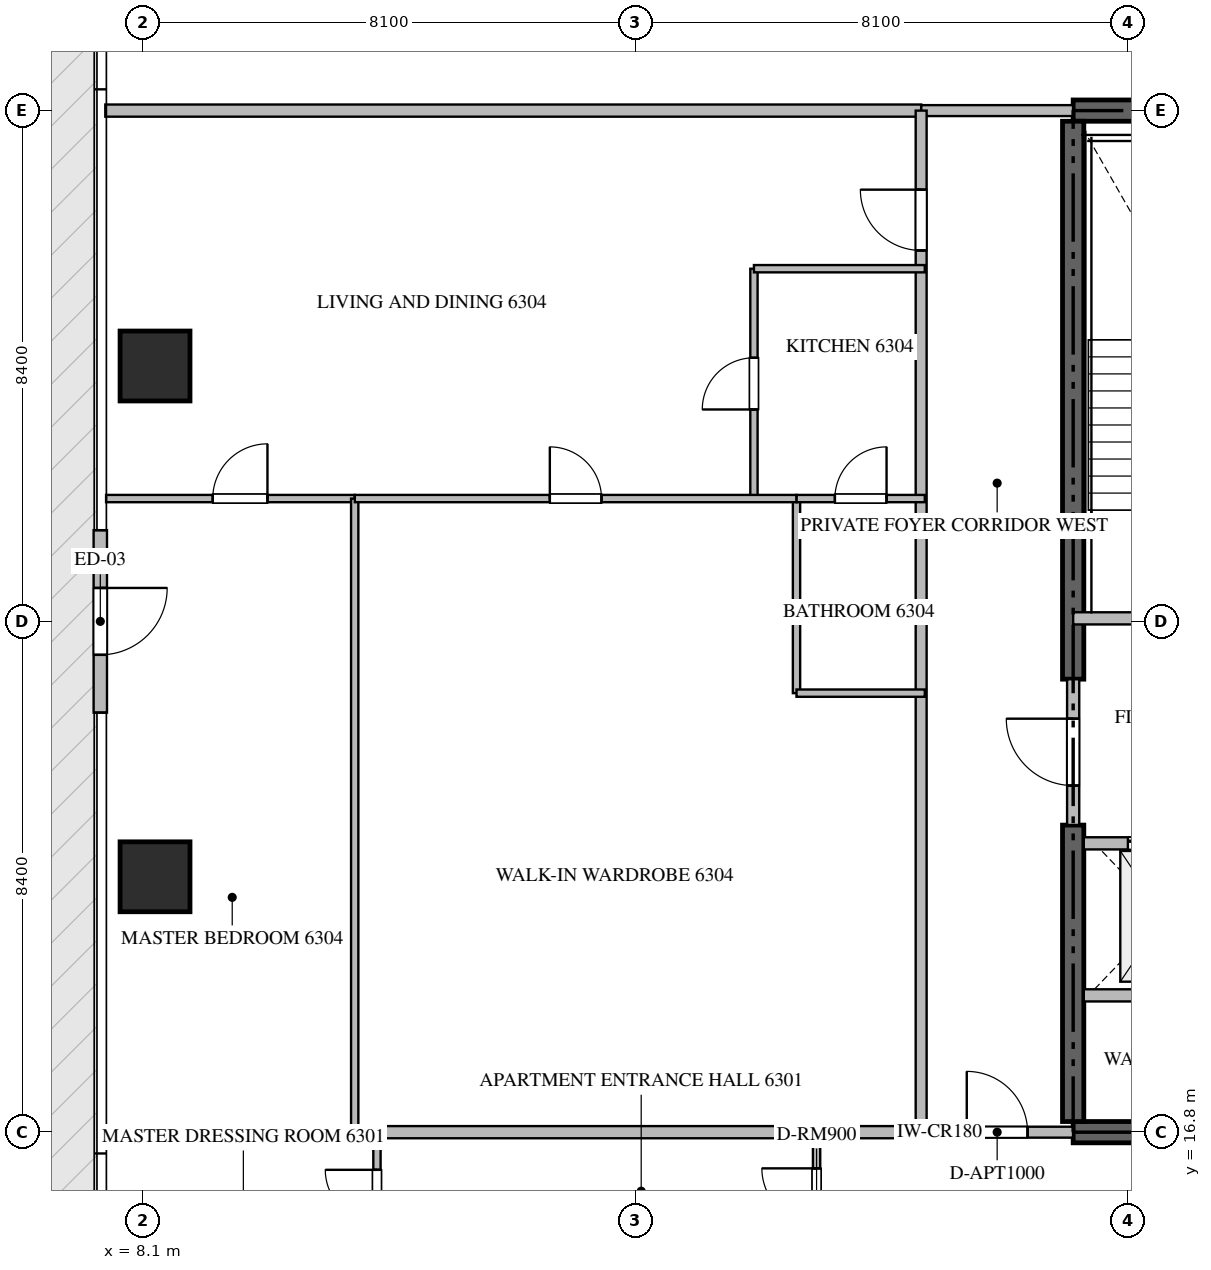
"""IFC4 building model, lengths in metres.
Left out: names, types, materials, properties, quantities, classifications, styles, units other than length and angle.
Written with IfcOpenShell. Run it as: python <this file> out.ifc"""

import sys

from ifc_helpers import new_model, si_unit, direction, frame, frame_2d, origin, origin_2d, place, context, subcontext, project, spatial, rectangle, extrude, source, transform, mapped, element, fill, save


model = new_model("IFC4")
c1 = context("Model", 3, precision=1e-05, world=origin(), true_north=direction((0.0, 1.0)))
c2 = subcontext(c1, "Body", "Model", "MODEL_VIEW")
j1 = project(units=[si_unit("LENGTHUNIT", "METRE"), si_unit("PLANEANGLEUNIT", "RADIAN")], contexts=[c1])
p1 = place(None, origin())
s1 = spatial("IfcSite", under=j1, at=p1, CompositionType="ELEMENT")
p2 = place(p1, origin())
s2 = spatial("IfcBuilding", under=s1, at=p2, CompositionType="ELEMENT")
p3 = place(p2, frame((0.0, 0.0, 252.8)))
s3 = spatial("IfcBuildingStorey", under=s2, at=p3, CompositionType="ELEMENT", Elevation=252.8)
for number, where, z_axis, x_axis in (
    (1, (23.4, 16.8, -0.26), (0.0, 0.0, 1.0), (1.0, 0.0, 0.0)),
    (2, (41.4, 33.6, -0.26), (0.0, 0.0, 1.0), (-1.0, 0.0, 0.0)),
):
    element("IfcWall", number, at=place(p3, frame(where, z_axis=z_axis, x_axis=x_axis)), inside=s3, PredefinedType="SHEAR", context=c2, shape_type="SweptSolid", body=[
        extrude(rectangle(XDim=18.0, YDim=0.35, at=frame_2d((9.0, 0.0))), origin(), (0.0, 0.0, 1.0), 3.848),
    ])
p4 = place(p3, frame((23.4, 16.975, -0.26), z_axis=(0.0, 0.0, 1.0), x_axis=(0.0, 1.0, 0.0)))
e3 = element("IfcWall", 3, at=p4, inside=s3, PredefinedType="SHEAR", context=c2, shape_type="SweptSolid", body=[
    extrude(rectangle(XDim=4.875, YDim=0.35, at=frame_2d((2.438, 0.0))), origin(), (0.0, 0.0, 1.0), 3.848),
])
p5 = place(p3, frame((23.4, 24.25, -0.26), z_axis=(0.0, 0.0, 1.0), x_axis=(0.0, 1.0, 0.0)))
e4 = element("IfcWall", 4, at=p5, inside=s3, PredefinedType="SHEAR", context=c2, shape_type="SweptSolid", body=[
    extrude(rectangle(XDim=9.175, YDim=0.35, at=frame_2d((4.587, 0.0))), origin(), (0.0, 0.0, 1.0), 3.848),
])
m1 = source(origin(), c2, "Body", "SweptSolid", [
    extrude(rectangle(XDim=1.15, YDim=1.15, at=origin_2d()), origin(), (0.0, 0.0, 1.0), 3.85),
])
for number, where, z_axis, x_axis in (
    (5, (8.3, 21.0, -0.26), (0.0, 0.0, 1.0), (1.0, 0.0, 0.0)),
    (6, (8.3, 29.4, -0.26), (0.0, 0.0, 1.0), (1.0, 0.0, 0.0)),
):
    element("IfcColumn", number, at=place(p3, frame(where, z_axis=z_axis, x_axis=x_axis)), inside=s3, PredefinedType="COLUMN", context=c2, shape_type="MappedRepresentation", body=[
        mapped(m1, transform((0.0, 0.0, 0.0), scale=1.0)),
    ])
p6 = place(p3, frame((7.4, 26.7, 0.0), z_axis=(0.0, 0.0, 1.0), x_axis=(0.0, -1.0, 0.0)))
e7 = element("IfcWall", 7, at=p6, inside=s3, PredefinedType="ELEMENTEDWALL", context=c2, shape_type="SweptSolid", body=[
    extrude(rectangle(XDim=3.0, YDim=0.22, at=frame_2d((1.5, 0.0))), origin(), (0.0, 0.0, 1.0), 3.575),
])
p7 = place(p6, frame((0.95, 0.0, 0.0)))
e8 = element("IfcOpeningElement", 8, at=p7, cuts=e7, PredefinedType="OPENING", context=c2, shape_type="SweptSolid", body=[
    extrude(rectangle(XDim=1.1, YDim=2.2, at=frame_2d((0.55, 1.1))), frame((0.0, 0.12, 0.0), z_axis=(0.0, -1.0, 0.0), x_axis=(1.0, 0.0, 0.0)), (0.0, 0.0, 1.0), 0.24),
])
p8 = place(p3, frame((23.4, 25.25, 0.0), z_axis=(0.0, 0.0, 1.0), x_axis=(1.0, 0.0, 0.0)))
e9 = element("IfcWall", 9, at=p8, inside=s3, PredefinedType="STANDARD", context=c2, shape_type="SweptSolid", body=[
    extrude(rectangle(XDim=4.45, YDim=0.2, at=frame_2d((2.225, 0.0))), origin(), (0.0, 0.0, 1.0), 3.59),
])
p9 = place(p8, frame((1.65, 0.0, 0.0)))
e10 = element("IfcOpeningElement", 10, at=p9, cuts=e9, PredefinedType="OPENING", context=c2, shape_type="SweptSolid", body=[
    extrude(rectangle(XDim=1.1, YDim=2.15, at=frame_2d((0.55, 1.075))), frame((0.0, 0.11, 0.0), z_axis=(0.0, -1.0, 0.0), x_axis=(1.0, 0.0, 0.0)), (0.0, 0.0, 1.0), 0.22),
])
p10 = place(p3, frame((23.575, 21.55, 0.0), z_axis=(0.0, 0.0, 1.0), x_axis=(1.0, 0.0, 0.0)))
e11 = element("IfcWall", 11, at=p10, inside=s3, PredefinedType="STANDARD", context=c2, shape_type="SweptSolid", body=[
    extrude(rectangle(XDim=2.475, YDim=0.2, at=frame_2d((1.238, 0.0))), origin(), (0.0, 0.0, 1.0), 3.59),
])
p11 = place(p10, frame((0.725, 0.0, 0.0)))
e12 = element("IfcOpeningElement", 12, at=p11, cuts=e11, PredefinedType="OPENING", context=c2, shape_type="SweptSolid", body=[
    extrude(rectangle(XDim=1.2, YDim=2.2, at=frame_2d((0.6, 1.1))), frame((0.0, 0.11, 0.0), z_axis=(0.0, -1.0, 0.0), x_axis=(1.0, 0.0, 0.0)), (0.0, 0.0, 1.0), 0.22),
])
p12 = place(p3, frame((23.575, 19.05, 0.0), z_axis=(0.0, 0.0, 1.0), x_axis=(1.0, 0.0, 0.0)))
e13 = element("IfcWall", 13, at=p12, inside=s3, PredefinedType="STANDARD", context=c2, shape_type="SweptSolid", body=[
    extrude(rectangle(XDim=2.475, YDim=0.2, at=frame_2d((1.238, 0.0))), origin(), (0.0, 0.0, 1.0), 3.59),
])
p13 = place(p3, frame((23.4, 21.852, 0.0), z_axis=(0.0, 0.0, 1.0), x_axis=(0.0, 1.0, 0.0)))
e14 = element("IfcWall", 14, at=p13, inside=s3, PredefinedType="STANDARD", context=c2, shape_type="SweptSolid", body=[
    extrude(rectangle(XDim=2.396, YDim=0.2, at=frame_2d((1.198, 0.0))), origin(), (0.0, 0.0, 1.0), 3.59),
])
p14 = place(p13, frame((0.648, 0.0, 0.0)))
e15 = element("IfcOpeningElement", 15, at=p14, cuts=e14, PredefinedType="OPENING", context=c2, shape_type="SweptSolid", body=[
    extrude(rectangle(XDim=1.1, YDim=2.15, at=frame_2d((0.55, 1.075))), frame((0.0, 0.11, 0.0), z_axis=(0.0, -1.0, 0.0), x_axis=(1.0, 0.0, 0.0)), (0.0, 0.0, 1.0), 0.22),
])
for number, where, z_axis, x_axis in (
    (16, (7.482, 16.8, 0.0), (0.0, 0.0, 1.0), (1.0, 0.0, 0.0)),
    (17, (7.482, 33.6, 0.0), (0.0, 0.0, 1.0), (1.0, 0.0, 0.0)),
):
    element("IfcWall", number, at=place(p3, frame(where, z_axis=z_axis, x_axis=x_axis)), inside=s3, PredefinedType="PARTITIONING", context=c2, shape_type="SweptSolid", body=[
        extrude(rectangle(XDim=13.418, YDim=0.2, at=frame_2d((6.709, 0.0))), origin(), (0.0, 0.0, 1.0), 3.59),
    ])
p15 = place(p3, frame((20.902, 16.8, 0.0), z_axis=(0.0, 0.0, 1.0), x_axis=(1.0, 0.0, 0.0)))
e18 = element("IfcWall", 18, at=p15, inside=s3, PredefinedType="PARTITIONING", context=c2, shape_type="SweptSolid", body=[
    extrude(rectangle(XDim=2.496, YDim=0.18, at=frame_2d((1.248, 0.0))), origin(), (0.0, 0.0, 1.0), 3.59),
])
p16 = place(p15, frame((0.748, 0.0, 0.0)))
e19 = element("IfcOpeningElement", 19, at=p16, cuts=e18, PredefinedType="OPENING", context=c2, shape_type="SweptSolid", body=[
    extrude(rectangle(XDim=1.0, YDim=2.15, at=frame_2d((0.5, 1.075))), frame((0.0, 0.1, 0.0), z_axis=(0.0, -1.0, 0.0), x_axis=(1.0, 0.0, 0.0)), (0.0, 0.0, 1.0), 0.2),
])
p17 = place(p3, frame((20.902, 33.6, 0.0), z_axis=(0.0, 0.0, 1.0), x_axis=(1.0, 0.0, 0.0)))
e20 = element("IfcWall", 20, at=p17, inside=s3, PredefinedType="PARTITIONING", context=c2, shape_type="SweptSolid", body=[
    extrude(rectangle(XDim=2.496, YDim=0.18, at=frame_2d((1.248, 0.0))), origin(), (0.0, 0.0, 1.0), 3.59),
])
p18 = place(p3, frame((20.9, 16.8, 0.0), z_axis=(0.0, 0.0, 1.0), x_axis=(0.0, 1.0, 0.0)))
e21 = element("IfcWall", 21, at=p18, inside=s3, PredefinedType="PARTITIONING", context=c2, shape_type="SweptSolid", body=[
    extrude(rectangle(XDim=16.8, YDim=0.18, at=frame_2d((8.4, 0.0))), origin(), (0.0, 0.0, 1.0), 3.59),
])
p19 = place(p18, frame((14.5, 0.0, 0.0)))
e22 = element("IfcOpeningElement", 22, at=p19, cuts=e21, PredefinedType="OPENING", context=c2, shape_type="SweptSolid", body=[
    extrude(rectangle(XDim=1.0, YDim=2.15, at=frame_2d((0.5, 1.075))), frame((0.0, 0.1, 0.0), z_axis=(0.0, -1.0, 0.0), x_axis=(1.0, 0.0, 0.0)), (0.0, 0.0, 1.0), 0.2),
])
p20 = place(p3, frame((19.18, 14.65, 0.0), z_axis=(0.0, 0.0, 1.0), x_axis=(0.0, 1.0, 0.0)))
e23 = element("IfcWall", 23, at=p20, inside=s3, PredefinedType="PARTITIONING", context=c2, shape_type="SweptSolid", body=[
    extrude(rectangle(XDim=2.21, YDim=0.12, at=frame_2d((1.105, 0.0))), origin(), (0.0, 0.0, 1.0), 3.59),
])
p21 = place(p20, frame((0.655, 0.0, 0.0)))
e24 = element("IfcOpeningElement", 24, at=p21, cuts=e23, PredefinedType="OPENING", context=c2, shape_type="SweptSolid", body=[
    extrude(rectangle(XDim=0.9, YDim=2.1, at=frame_2d((0.45, 1.05))), frame((0.0, 0.07, 0.0), z_axis=(0.0, -1.0, 0.0), x_axis=(1.0, 0.0, 0.0)), (0.0, 0.0, 1.0), 0.14),
])
p22 = place(p3, frame((11.95, 14.652, 0.0), z_axis=(0.0, 0.0, 1.0), x_axis=(0.0, 1.0, 0.0)))
e25 = element("IfcWall", 25, at=p22, inside=s3, PredefinedType="PARTITIONING", context=c2, shape_type="SweptSolid", body=[
    extrude(rectangle(XDim=2.208, YDim=0.12, at=frame_2d((1.104, 0.0))), origin(), (0.0, 0.0, 1.0), 3.59),
])
p23 = place(p22, frame((0.679, 0.0, 0.0)))
e26 = element("IfcOpeningElement", 26, at=p23, cuts=e25, PredefinedType="OPENING", context=c2, shape_type="SweptSolid", body=[
    extrude(rectangle(XDim=0.85, YDim=2.1, at=frame_2d((0.425, 1.05))), frame((0.0, 0.07, 0.0), z_axis=(0.0, -1.0, 0.0), x_axis=(1.0, 0.0, 0.0)), (0.0, 0.0, 1.0), 0.14),
])
p24 = place(p3, frame((18.15, 27.22, 0.0), z_axis=(0.0, 0.0, 1.0), x_axis=(0.0, 1.0, 0.0)))
e27 = element("IfcWall", 27, at=p24, inside=s3, PredefinedType="PARTITIONING", context=c2, shape_type="SweptSolid", body=[
    extrude(rectangle(XDim=3.78, YDim=0.12, at=frame_2d((1.89, 0.0))), origin(), (0.0, 0.0, 1.0), 3.59),
])
p25 = place(p24, frame((1.465, 0.0, 0.0)))
e28 = element("IfcOpeningElement", 28, at=p25, cuts=e27, PredefinedType="OPENING", context=c2, shape_type="SweptSolid", body=[
    extrude(rectangle(XDim=0.85, YDim=2.1, at=frame_2d((0.425, 1.05))), frame((0.0, 0.07, 0.0), z_axis=(0.0, -1.0, 0.0), x_axis=(1.0, 0.0, 0.0)), (0.0, 0.0, 1.0), 0.14),
])
p26 = place(p3, frame((18.15, 31.0, 0.0), z_axis=(0.0, 0.0, 1.0), x_axis=(1.0, 0.0, 0.0)))
e29 = element("IfcWall", 29, at=p26, inside=s3, PredefinedType="PARTITIONING", context=c2, shape_type="SweptSolid", body=[
    extrude(rectangle(XDim=2.81, YDim=0.12, at=frame_2d((1.405, 0.0))), origin(), (0.0, 0.0, 1.0), 3.59),
])
p27 = place(p3, frame((7.495, 27.22, 0.0), z_axis=(0.0, 0.0, 1.0), x_axis=(1.0, 0.0, 0.0)))
e30 = element("IfcWall", 30, at=p27, inside=s3, PredefinedType="PARTITIONING", context=c2, shape_type="SweptSolid", body=[
    extrude(rectangle(XDim=4.089, YDim=0.12, at=frame_2d((2.044, 0.0))), origin(), (0.0, 0.0, 1.0), 3.59),
])
p28 = place(p27, frame((1.754, 0.0, 0.0)))
e31 = element("IfcOpeningElement", 31, at=p28, cuts=e30, PredefinedType="OPENING", context=c2, shape_type="SweptSolid", body=[
    extrude(rectangle(XDim=0.9, YDim=2.1, at=frame_2d((0.45, 1.05))), frame((0.0, 0.07, 0.0), z_axis=(0.0, -1.0, 0.0), x_axis=(1.0, 0.0, 0.0)), (0.0, 0.0, 1.0), 0.14),
])
p29 = place(p3, frame((11.584, 16.74, 0.0), z_axis=(0.0, 0.0, 1.0), x_axis=(0.0, 1.0, 0.0)))
e32 = element("IfcWall", 32, at=p29, inside=s3, PredefinedType="PARTITIONING", context=c2, shape_type="SweptSolid", body=[
    extrude(rectangle(XDim=10.48, YDim=0.12, at=frame_2d((5.24, 0.0))), origin(), (0.0, 0.0, 1.0), 3.59),
])
p30 = place(p3, frame((18.85, 24.02, 0.0), z_axis=(0.0, 0.0, 1.0), x_axis=(0.0, 1.0, 0.0)))
e33 = element("IfcWall", 33, at=p30, inside=s3, PredefinedType="PARTITIONING", context=c2, shape_type="SweptSolid", body=[
    extrude(rectangle(XDim=3.2, YDim=0.12, at=frame_2d((1.6, 0.0))), origin(), (0.0, 0.0, 1.0), 3.59),
])
p31 = place(p3, frame((18.85, 24.02, 0.0), z_axis=(0.0, 0.0, 1.0), x_axis=(1.0, 0.0, 0.0)))
e34 = element("IfcWall", 34, at=p31, inside=s3, PredefinedType="PARTITIONING", context=c2, shape_type="SweptSolid", body=[
    extrude(rectangle(XDim=2.11, YDim=0.12, at=frame_2d((1.055, 0.0))), origin(), (0.0, 0.0, 1.0), 3.59),
])
p32 = place(p3, frame((11.586, 27.22, 0.0), z_axis=(0.0, 0.0, 1.0), x_axis=(1.0, 0.0, 0.0)))
e35 = element("IfcWall", 35, at=p32, inside=s3, PredefinedType="PARTITIONING", context=c2, shape_type="SweptSolid", body=[
    extrude(rectangle(XDim=7.264, YDim=0.12, at=frame_2d((3.632, 0.0))), origin(), (0.0, 0.0, 1.0), 3.59),
])
p33 = place(p32, frame((3.207, 0.0, 0.0)))
e36 = element("IfcOpeningElement", 36, at=p33, cuts=e35, PredefinedType="OPENING", context=c2, shape_type="SweptSolid", body=[
    extrude(rectangle(XDim=0.85, YDim=2.1, at=frame_2d((0.425, 1.05))), frame((0.0, 0.07, 0.0), z_axis=(0.0, -1.0, 0.0), x_axis=(1.0, 0.0, 0.0)), (0.0, 0.0, 1.0), 0.14),
])
p34 = place(p3, frame((18.852, 27.22, 0.0), z_axis=(0.0, 0.0, 1.0), x_axis=(1.0, 0.0, 0.0)))
e37 = element("IfcWall", 37, at=p34, inside=s3, PredefinedType="PARTITIONING", context=c2, shape_type="SweptSolid", body=[
    extrude(rectangle(XDim=2.108, YDim=0.12, at=frame_2d((1.054, 0.0))), origin(), (0.0, 0.0, 1.0), 3.59),
])
p35 = place(p34, frame((0.629, 0.0, 0.0)))
e38 = element("IfcOpeningElement", 38, at=p35, cuts=e37, PredefinedType="OPENING", context=c2, shape_type="SweptSolid", body=[
    extrude(rectangle(XDim=0.85, YDim=2.1, at=frame_2d((0.425, 1.05))), frame((0.0, 0.07, 0.0), z_axis=(0.0, -1.0, 0.0), x_axis=(1.0, 0.0, 0.0)), (0.0, 0.0, 1.0), 0.14),
])
m2 = source(origin(), c2, "Body", "SweptSolid", [
    extrude(rectangle(XDim=1.1, YDim=2.2, at=frame_2d((0.55, 1.1))), frame((0.0, 0.025, 0.0), z_axis=(0.0, -1.0, 0.0), x_axis=(1.0, 0.0, 0.0)), (0.0, 0.0, 1.0), 0.05),
])
p36 = place(p7, origin())
e39 = element("IfcDoor", 39, at=p36, inside=s3, OperationType="SINGLE_SWING_LEFT", PredefinedType="DOOR", context=c2, shape_type="MappedRepresentation", body=[
    mapped(m2, transform((0.0, 0.0, 0.0), scale=1.0)),
])
fill(e8, e39)
m3 = source(origin(), c2, "Body", "SweptSolid", [
    extrude(rectangle(XDim=1.2, YDim=2.2, at=frame_2d((0.6, 1.1))), frame((0.0, 0.025, 0.0), z_axis=(0.0, -1.0, 0.0), x_axis=(1.0, 0.0, 0.0)), (0.0, 0.0, 1.0), 0.05),
])
p37 = place(p11, origin())
e40 = element("IfcDoor", 40, at=p37, inside=s3, OperationType="DOUBLE_DOOR_SLIDING", PredefinedType="DOOR", context=c2, shape_type="MappedRepresentation", body=[
    mapped(m3, transform((0.0, 0.0, 0.0), scale=1.0)),
])
fill(e12, e40)
m4 = source(origin(), c2, "Body", "SweptSolid", [
    extrude(rectangle(XDim=1.1, YDim=2.15, at=frame_2d((0.55, 1.075))), frame((0.0, 0.025, 0.0), z_axis=(0.0, -1.0, 0.0), x_axis=(1.0, 0.0, 0.0)), (0.0, 0.0, 1.0), 0.05),
])
p38 = place(p14, origin())
e41 = element("IfcDoor", 41, at=p38, inside=s3, OperationType="SINGLE_SWING_RIGHT", PredefinedType="DOOR", context=c2, shape_type="MappedRepresentation", body=[
    mapped(m4, transform((0.0, 0.0, 0.0), scale=1.0)),
])
fill(e15, e41)
m5 = source(origin(), c2, "Body", "SweptSolid", [
    extrude(rectangle(XDim=1.0, YDim=2.15, at=frame_2d((0.5, 1.075))), frame((0.0, 0.025, 0.0), z_axis=(0.0, -1.0, 0.0), x_axis=(1.0, 0.0, 0.0)), (0.0, 0.0, 1.0), 0.05),
])
p39 = place(p16, origin())
e42 = element("IfcDoor", 42, at=p39, inside=s3, OperationType="SINGLE_SWING_LEFT", PredefinedType="DOOR", context=c2, shape_type="MappedRepresentation", body=[
    mapped(m5, transform((0.0, 0.0, 0.0), scale=1.0)),
])
fill(e19, e42)
p40 = place(p19, origin())
e43 = element("IfcDoor", 43, at=p40, inside=s3, OperationType="SINGLE_SWING_RIGHT", PredefinedType="DOOR", context=c2, shape_type="MappedRepresentation", body=[
    mapped(m5, transform((0.0, 0.0, 0.0), scale=1.0)),
])
fill(e22, e43)
m6 = source(origin(), c2, "Body", "SweptSolid", [
    extrude(rectangle(XDim=0.9, YDim=2.1, at=frame_2d((0.45, 1.05))), frame((0.0, 0.025, 0.0), z_axis=(0.0, -1.0, 0.0), x_axis=(1.0, 0.0, 0.0)), (0.0, 0.0, 1.0), 0.05),
])
p41 = place(p21, origin())
e44 = element("IfcDoor", 44, at=p41, inside=s3, OperationType="SINGLE_SWING_RIGHT", PredefinedType="DOOR", context=c2, shape_type="MappedRepresentation", body=[
    mapped(m6, transform((0.0, 0.0, 0.0), scale=1.0)),
])
fill(e24, e44)
m7 = source(origin(), c2, "Body", "SweptSolid", [
    extrude(rectangle(XDim=0.85, YDim=2.1, at=frame_2d((0.425, 1.05))), frame((0.0, 0.025, 0.0), z_axis=(0.0, -1.0, 0.0), x_axis=(1.0, 0.0, 0.0)), (0.0, 0.0, 1.0), 0.05),
])
p42 = place(p23, origin())
e45 = element("IfcDoor", 45, at=p42, inside=s3, OperationType="SINGLE_SWING_RIGHT", PredefinedType="DOOR", context=c2, shape_type="MappedRepresentation", body=[
    mapped(m7, transform((0.0, 0.0, 0.0), scale=1.0)),
])
fill(e26, e45)
p43 = place(p25, origin())
e46 = element("IfcDoor", 46, at=p43, inside=s3, OperationType="SINGLE_SWING_LEFT", PredefinedType="DOOR", context=c2, shape_type="MappedRepresentation", body=[
    mapped(m7, transform((0.0, 0.0, 0.0), scale=1.0)),
])
fill(e28, e46)
p44 = place(p28, origin())
e47 = element("IfcDoor", 47, at=p44, inside=s3, OperationType="SINGLE_SWING_RIGHT", PredefinedType="DOOR", context=c2, shape_type="MappedRepresentation", body=[
    mapped(m6, transform((0.0, 0.0, 0.0), scale=1.0)),
])
fill(e31, e47)
p45 = place(p33, origin())
e48 = element("IfcDoor", 48, at=p45, inside=s3, OperationType="SINGLE_SWING_LEFT", PredefinedType="DOOR", context=c2, shape_type="MappedRepresentation", body=[
    mapped(m7, transform((0.0, 0.0, 0.0), scale=1.0)),
])
fill(e36, e48)
p46 = place(p35, origin())
e49 = element("IfcDoor", 49, at=p46, inside=s3, OperationType="SINGLE_SWING_RIGHT", PredefinedType="DOOR", context=c2, shape_type="MappedRepresentation", body=[
    mapped(m7, transform((0.0, 0.0, 0.0), scale=1.0)),
])
fill(e38, e49)
save(model, sys.argv[1])
